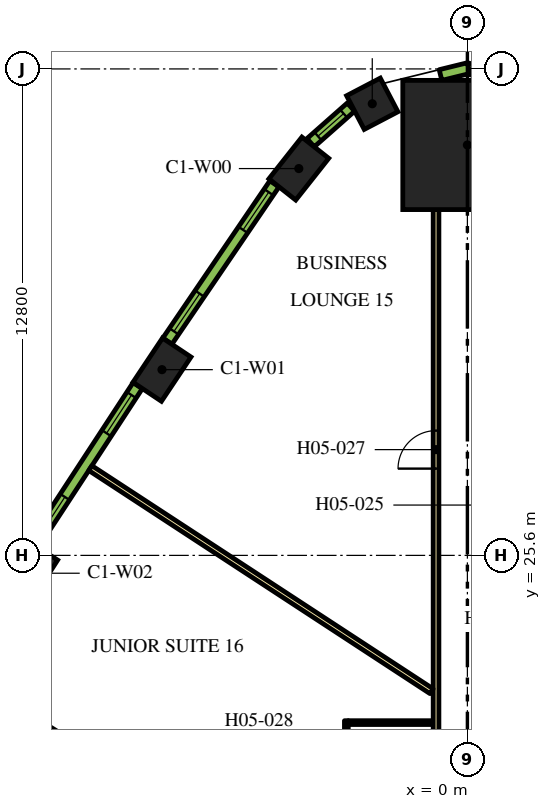
"""IFC4 building model, lengths in metres.
Left out: names, types, materials, properties, quantities, classifications, styles, units other than length and angle.
Written with IfcOpenShell. Run it as: python <this file> out.ifc"""

import sys

from ifc_helpers import new_model, si_unit, direction, frame, frame_2d, origin, origin_2d, place, context, subcontext, project, spatial, rectangle, extrude, element, fill, save


model = new_model("IFC4")
c1 = context("Model", 3, precision=1e-05, world=origin(), true_north=direction((0.0, 1.0)))
c2 = subcontext(c1, "Body", "Model", "MODEL_VIEW")
j1 = project(units=[si_unit("LENGTHUNIT", "METRE"), si_unit("PLANEANGLEUNIT", "RADIAN")], contexts=[c1])
p1 = place(None, origin())
s1 = spatial("IfcSite", under=j1, at=p1, CompositionType="ELEMENT")
p2 = place(p1, origin())
s2 = spatial("IfcBuilding", under=s1, at=p2, CompositionType="ELEMENT")
p3 = place(p2, frame((0.0, 0.0, 74.4)))
s3 = spatial("IfcBuildingStorey", under=s2, at=p3, CompositionType="ELEMENT", Elevation=74.4)
p4 = place(p3, frame((0.0, 36.399, 0.0), z_axis=(0.0, 0.0, 1.0), x_axis=(0.0, 1.0, 0.0)))
e1 = element("IfcColumn", 1, at=p4, inside=s3, PredefinedType="COLUMN", context=c2, shape_type="SweptSolid", body=[
    extrude(rectangle(XDim=3.4, YDim=3.4, at=origin_2d()), origin(), (0.0, 0.0, 1.0), 3.9),
])
p5 = place(p3, frame((-2.503, 37.484, 0.0), z_axis=(0.0, 0.0, 1.0), x_axis=(-0.886067695645, -0.463555863661, 0.0)))
e2 = element("IfcColumn", 2, at=p5, inside=s3, PredefinedType="COLUMN", context=c2, shape_type="SweptSolid", body=[
    extrude(rectangle(XDim=1.0, YDim=1.0, at=origin_2d()), origin(), (0.0, 0.0, 1.0), 3.9),
])
for number, where, z_axis, x_axis in (
    (3, (-4.436, 35.778, 0.0), (0.0, 0.0, 1.0), (-0.62, -0.784, 0.0)),
    (4, (-8.037, 30.487, 0.0), (0.0, 0.0, 1.0), (-0.555, -0.832, 0.0)),
    (5, (-11.539, 25.131, 0.0), (0.0, 0.0, 1.0), (-0.539, -0.842, 0.0)),
):
    element("IfcColumn", number, at=place(p3, frame(where, z_axis=z_axis, x_axis=x_axis)), inside=s3, PredefinedType="COLUMN", context=c2, shape_type="SweptSolid", body=[
        extrude(rectangle(XDim=1.4, YDim=0.9, at=origin_2d()), origin(), (0.0, 0.0, 1.0), 3.9),
    ])
p6 = place(p3, frame((-0.825, 18.475, 0.0), z_axis=(0.0, 0.0, 1.0), x_axis=(0.0, 1.0, 0.0)))
e6 = element("IfcWall", 6, at=p6, inside=s3, PredefinedType="PARTITIONING", context=c2, shape_type="SweptSolid", body=[
    extrude(rectangle(XDim=16.224, YDim=0.15, at=frame_2d((8.112, 0.0))), origin(), (0.0, 0.0, 1.0), 2.7),
])
p7 = place(p6, frame((9.408, 0.0, 0.0)))
e7 = element("IfcOpeningElement", 7, at=p7, cuts=e6, PredefinedType="OPENING", context=c2, shape_type="SweptSolid", body=[
    extrude(rectangle(XDim=1.0, YDim=2.1, at=frame_2d((0.5, 1.05))), frame((0.0, 0.085, 0.0), z_axis=(0.0, -1.0, 0.0), x_axis=(1.0, 0.0, 0.0)), (0.0, 0.0, 1.0), 0.17),
])
p8 = place(p3, frame((-13.376, 22.506, 0.0), z_axis=(0.0, 0.0, 1.0), x_axis=(0.846945608893, -0.531679542183, 0.0)))
e8 = element("IfcWall", 8, at=p8, inside=s3, PredefinedType="PARTITIONING", context=c2, shape_type="SweptSolid", body=[
    extrude(rectangle(XDim=8.182, YDim=0.15, at=frame_2d((4.091, 0.0))), origin(), (0.0, 0.0, 1.0), 2.7),
])
p9 = place(p3, frame((-9.922, 27.896, 0.0), z_axis=(0.0, 0.0, 1.0), x_axis=(0.836970816595, -0.547247523675, 0.0)))
e9 = element("IfcWall", 9, at=p9, inside=s3, PredefinedType="PARTITIONING", context=c2, shape_type="SweptSolid", body=[
    extrude(rectangle(XDim=10.729, YDim=0.15, at=frame_2d((5.364, 0.0))), origin(), (0.0, 0.0, 1.0), 2.7),
])
p10 = place(p3, frame((-3.185, 21.25, 0.0), z_axis=(0.0, 0.0, 1.0), x_axis=(0.0, -1.0, 0.0)))
e10 = element("IfcWall", 10, at=p10, inside=s3, PredefinedType="PARTITIONING", context=c2, shape_type="SweptSolid", body=[
    extrude(rectangle(XDim=2.7, YDim=0.1, at=frame_2d((1.35, 0.0))), origin(), (0.0, 0.0, 1.0), 2.7),
])
p11 = place(p10, frame((1.2, 0.0, 0.0)))
e11 = element("IfcOpeningElement", 11, at=p11, cuts=e10, PredefinedType="OPENING", context=c2, shape_type="SweptSolid", body=[
    extrude(rectangle(XDim=0.9, YDim=2.1, at=frame_2d((0.45, 1.05))), frame((0.0, 0.06, 0.0), z_axis=(0.0, -1.0, 0.0), x_axis=(1.0, 0.0, 0.0)), (0.0, 0.0, 1.0), 0.12),
])
p12 = place(p3, frame((-3.135, 21.2, 0.0), z_axis=(0.0, 0.0, 1.0), x_axis=(1.0, 0.0, 0.0)))
e12 = element("IfcWall", 12, at=p12, inside=s3, PredefinedType="PARTITIONING", context=c2, shape_type="SweptSolid", body=[
    extrude(rectangle(XDim=2.23, YDim=0.1, at=frame_2d((1.115, 0.0))), origin(), (0.0, 0.0, 1.0), 2.7),
])
for number, where, z_axis, x_axis in (
    (13, (0.707, 38.239, 0.0), (0.0, 0.0, 1.0), (-0.971, 0.238, 0.0)),
    (14, (0.035, 38.421, 0.0), (0.0, 0.0, 1.0), (-0.971, -0.238, 0.0)),
):
    element("IfcWall", number, at=place(p3, frame(where, z_axis=z_axis, x_axis=x_axis)), inside=s3, PredefinedType="SOLIDWALL", context=c2, shape_type="SweptSolid", body=[
        extrude(rectangle(XDim=0.764, YDim=0.29, at=frame_2d((0.382, 0.0))), origin(), (0.0, 0.0, 1.0), 3.6),
    ])
p13 = place(p3, frame((-3.064, 37.395, 0.0), z_axis=(0.0, 0.0, 1.0), x_axis=(-0.749812680302, -0.661650167731, 0.0)))
e15 = element("IfcWall", 15, at=p13, inside=s3, PredefinedType="SOLIDWALL", context=c2, shape_type="SweptSolid", body=[
    extrude(rectangle(XDim=1.415, YDim=0.29, at=frame_2d((0.708, 0.0))), origin(), (0.0, 0.0, 1.0), 3.6),
])
p14 = place(p13, frame((0.258, 0.0, 0.9)))
e16 = element("IfcOpeningElement", 16, at=p14, cuts=e15, PredefinedType="OPENING", context=c2, shape_type="SweptSolid", body=[
    extrude(rectangle(XDim=0.9, YDim=2.15, at=frame_2d((0.45, 1.075))), frame((0.0, 0.155, 0.0), z_axis=(0.0, -1.0, 0.0), x_axis=(1.0, 0.0, 0.0)), (0.0, 0.0, 1.0), 0.31),
])
p15 = place(p3, frame((-5.078, 35.376, 0.0), z_axis=(0.0, 0.0, 1.0), x_axis=(-0.562610153679, -0.826722332454, 0.0)))
e17 = element("IfcWall", 17, at=p15, inside=s3, PredefinedType="SOLIDWALL", context=c2, shape_type="SweptSolid", body=[
    extrude(rectangle(XDim=5.006, YDim=0.29, at=frame_2d((2.503, 0.0))), origin(), (0.0, 0.0, 1.0), 3.6),
])
p16 = place(p15, frame((0.265, 0.0, 0.9)))
e18 = element("IfcOpeningElement", 18, at=p16, cuts=e17, PredefinedType="OPENING", context=c2, shape_type="SweptSolid", body=[
    extrude(rectangle(XDim=1.2, YDim=2.15, at=frame_2d((0.6, 1.075))), frame((0.0, 0.155, 0.0), z_axis=(0.0, -1.0, 0.0), x_axis=(1.0, 0.0, 0.0)), (0.0, 0.0, 1.0), 0.31),
])
p17 = place(p15, frame((3.495, 0.0, 0.9)))
e19 = element("IfcOpeningElement", 19, at=p17, cuts=e17, PredefinedType="OPENING", context=c2, shape_type="SweptSolid", body=[
    extrude(rectangle(XDim=1.2, YDim=2.15, at=frame_2d((0.6, 1.075))), frame((0.0, 0.155, 0.0), z_axis=(0.0, -1.0, 0.0), x_axis=(1.0, 0.0, 0.0)), (0.0, 0.0, 1.0), 0.31),
])
p18 = place(p3, frame((-8.676, 30.068, 0.0), z_axis=(0.0, 0.0, 1.0), x_axis=(-0.547204617628, -0.836998868845, 0.0)))
e20 = element("IfcWall", 20, at=p18, inside=s3, PredefinedType="SOLIDWALL", context=c2, shape_type="SweptSolid", body=[
    extrude(rectangle(XDim=4.998, YDim=0.29, at=frame_2d((2.499, 0.0))), origin(), (0.0, 0.0, 1.0), 3.6),
])
p19 = place(p18, frame((0.297, 0.0, 0.9)))
e21 = element("IfcOpeningElement", 21, at=p19, cuts=e20, PredefinedType="OPENING", context=c2, shape_type="SweptSolid", body=[
    extrude(rectangle(XDim=1.2, YDim=2.15, at=frame_2d((0.6, 1.075))), frame((0.0, 0.155, 0.0), z_axis=(0.0, -1.0, 0.0), x_axis=(1.0, 0.0, 0.0)), (0.0, 0.0, 1.0), 0.31),
])
p20 = place(p18, frame((3.501, 0.0, 0.9)))
e22 = element("IfcOpeningElement", 22, at=p20, cuts=e20, PredefinedType="OPENING", context=c2, shape_type="SweptSolid", body=[
    extrude(rectangle(XDim=1.2, YDim=2.15, at=frame_2d((0.6, 1.075))), frame((0.0, 0.155, 0.0), z_axis=(0.0, -1.0, 0.0), x_axis=(1.0, 0.0, 0.0)), (0.0, 0.0, 1.0), 0.31),
])
p21 = place(p7, origin())
e23 = element("IfcDoor", 23, at=p21, inside=s3, OperationType="SINGLE_SWING_LEFT", PredefinedType="DOOR", context=c2, shape_type="SweptSolid", body=[
    extrude(rectangle(XDim=1.0, YDim=2.1, at=frame_2d((0.5, 1.05))), frame((0.0, 0.025, 0.0), z_axis=(0.0, -1.0, 0.0), x_axis=(1.0, 0.0, 0.0)), (0.0, 0.0, 1.0), 0.05),
])
fill(e7, e23)
p22 = place(p14, origin())
e24 = element("IfcWindow", 24, at=p22, inside=s3, PartitioningType="SINGLE_PANEL", PredefinedType="WINDOW", context=c2, shape_type="SweptSolid", body=[
    extrude(rectangle(XDim=0.9, YDim=2.15, at=frame_2d((0.45, 1.075))), frame((0.0, 0.015, 0.0), z_axis=(0.0, -1.0, 0.0), x_axis=(1.0, 0.0, 0.0)), (0.0, 0.0, 1.0), 0.06),
])
fill(e16, e24)
p23 = place(p16, origin())
e25 = element("IfcWindow", 25, at=p23, inside=s3, PartitioningType="DOUBLE_PANEL_VERTICAL", PredefinedType="WINDOW", context=c2, shape_type="SweptSolid", body=[
    extrude(rectangle(XDim=1.2, YDim=2.15, at=frame_2d((0.6, 1.075))), frame((0.0, 0.015, 0.0), z_axis=(0.0, -1.0, 0.0), x_axis=(1.0, 0.0, 0.0)), (0.0, 0.0, 1.0), 0.06),
])
fill(e18, e25)
p24 = place(p17, origin())
e26 = element("IfcWindow", 26, at=p24, inside=s3, PartitioningType="DOUBLE_PANEL_VERTICAL", PredefinedType="WINDOW", context=c2, shape_type="SweptSolid", body=[
    extrude(rectangle(XDim=1.2, YDim=2.15, at=frame_2d((0.6, 1.075))), frame((0.0, 0.015, 0.0), z_axis=(0.0, -1.0, 0.0), x_axis=(1.0, 0.0, 0.0)), (0.0, 0.0, 1.0), 0.06),
])
fill(e19, e26)
p25 = place(p19, origin())
e27 = element("IfcWindow", 27, at=p25, inside=s3, PartitioningType="DOUBLE_PANEL_VERTICAL", PredefinedType="WINDOW", context=c2, shape_type="SweptSolid", body=[
    extrude(rectangle(XDim=1.2, YDim=2.15, at=frame_2d((0.6, 1.075))), frame((0.0, 0.015, 0.0), z_axis=(0.0, -1.0, 0.0), x_axis=(1.0, 0.0, 0.0)), (0.0, 0.0, 1.0), 0.06),
])
fill(e21, e27)
p26 = place(p20, origin())
e28 = element("IfcWindow", 28, at=p26, inside=s3, PartitioningType="DOUBLE_PANEL_VERTICAL", PredefinedType="WINDOW", context=c2, shape_type="SweptSolid", body=[
    extrude(rectangle(XDim=1.2, YDim=2.15, at=frame_2d((0.6, 1.075))), frame((0.0, 0.015, 0.0), z_axis=(0.0, -1.0, 0.0), x_axis=(1.0, 0.0, 0.0)), (0.0, 0.0, 1.0), 0.06),
])
fill(e22, e28)
save(model, sys.argv[1])
